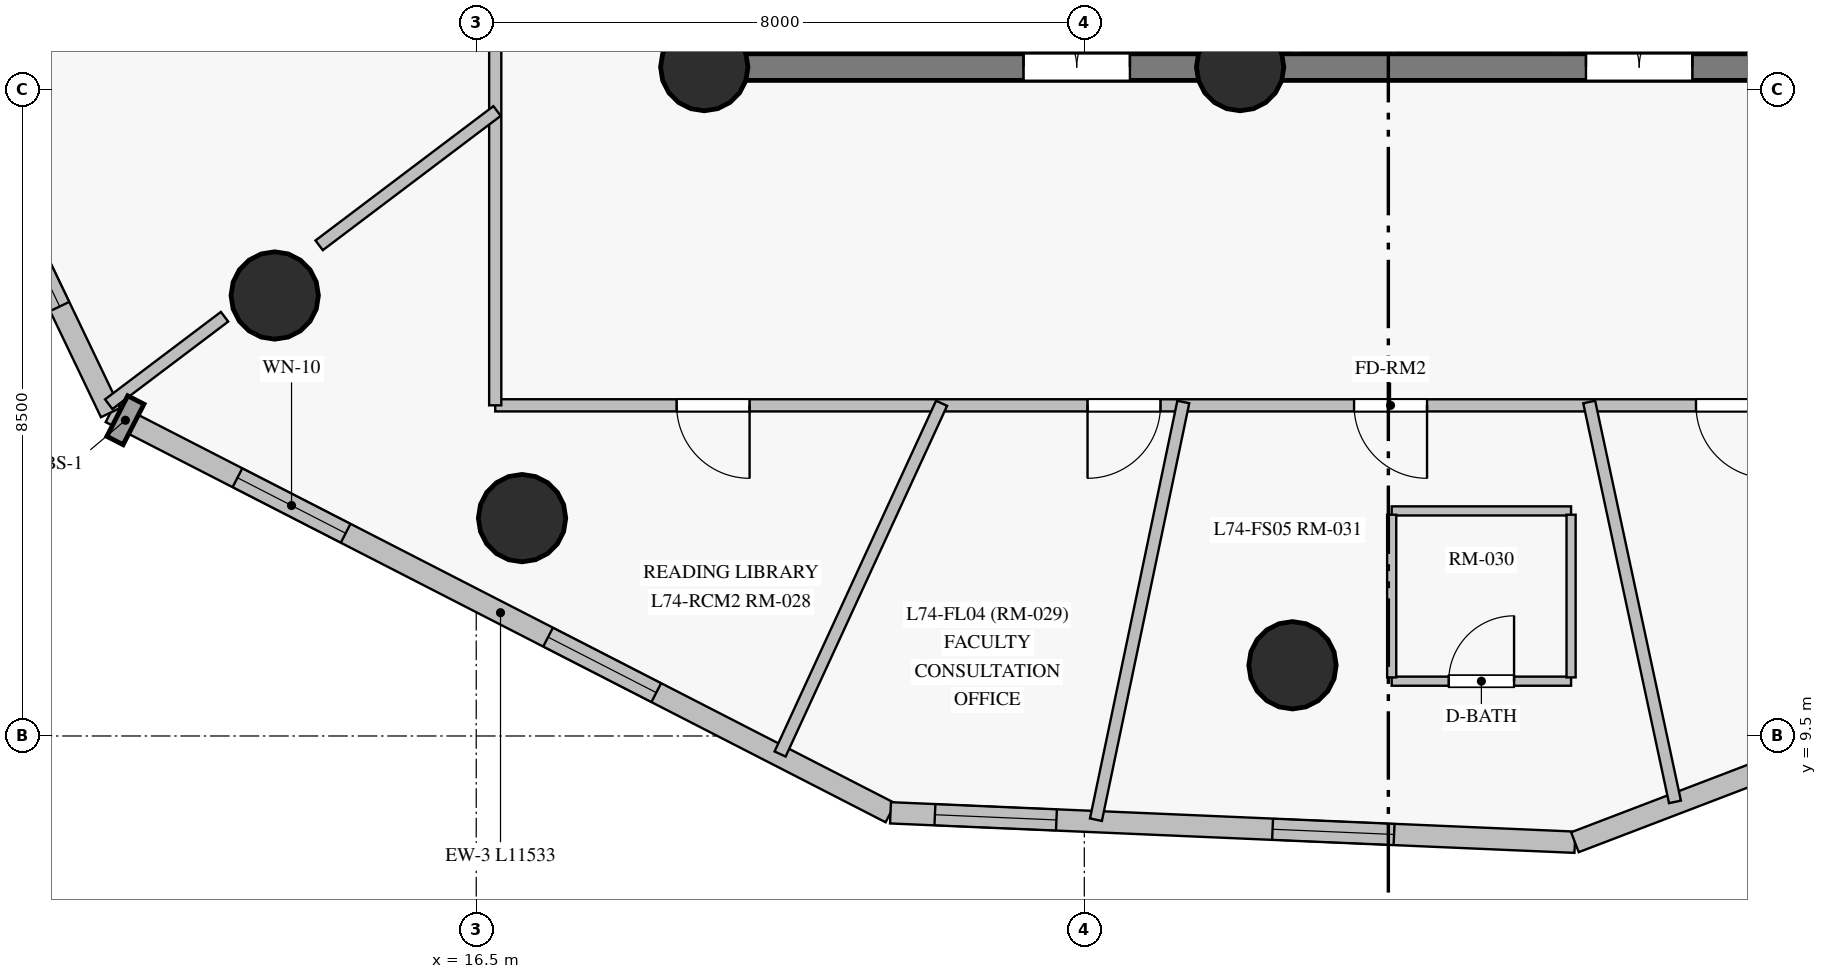
"""IFC4 building model, lengths in metres.
Left out: names, types, materials, properties, quantities, classifications, styles, units other than length and angle.
Written with IfcOpenShell. Run it as: python <this file> out.ifc"""

import sys

from ifc_helpers import new_model, si_unit, direction, frame, frame_2d, origin, origin_with_axes, origin_2d, place, context, subcontext, project, spatial, rectangle, circle, extrude, source, transform, mapped, element, fill, save


model = new_model("IFC4")
c1 = context("Model", 3, precision=1e-05, world=origin(), true_north=direction((0.0, 1.0)))
c2 = subcontext(c1, "Body", "Model", "MODEL_VIEW")
j1 = project(units=[si_unit("LENGTHUNIT", "METRE"), si_unit("PLANEANGLEUNIT", "RADIAN")], contexts=[c1])
p1 = place(None, origin())
s1 = spatial("IfcSite", under=j1, at=p1, CompositionType="ELEMENT")
p2 = place(p1, origin())
s2 = spatial("IfcBuilding", under=s1, at=p2, CompositionType="ELEMENT")
p3 = place(p2, frame((0.0, 0.0, 250.45)))
s3 = spatial("IfcBuildingStorey", under=s2, at=p3, CompositionType="ELEMENT", Elevation=250.45)
p4 = place(p3, frame((19.5, 18.3, 0.0), z_axis=(0.0, 0.0, 1.0), x_axis=(1.0, 0.0, 0.0)))
e1 = element("IfcWall", 1, at=p4, inside=s3, PredefinedType="SHEAR", context=c2, shape_type="SweptSolid", body=[
    extrude(rectangle(XDim=7.05, YDim=0.35, at=frame_2d((3.525, 0.0))), origin(), (0.0, 0.0, 1.0), 2.85),
])
p5 = place(p4, frame((4.2, 0.0, 0.0)))
e2 = element("IfcOpeningElement", 2, at=p5, cuts=e1, PredefinedType="OPENING", context=c2, shape_type="SweptSolid", body=[
    extrude(rectangle(XDim=1.4, YDim=2.2, at=frame_2d((0.7, 1.1))), frame((0.0, 0.185, 0.0), z_axis=(0.0, -1.0, 0.0), x_axis=(1.0, 0.0, 0.0)), (0.0, 0.0, 1.0), 0.37),
])
p6 = place(p3, frame((26.55, 18.3, 0.0), z_axis=(0.0, 0.0, 1.0), x_axis=(1.0, 0.0, 0.0)))
e3 = element("IfcWall", 3, at=p6, inside=s3, PredefinedType="SHEAR", context=c2, shape_type="SweptSolid", body=[
    extrude(rectangle(XDim=10.95, YDim=0.35, at=frame_2d((5.475, 0.0))), origin(), (0.0, 0.0, 1.0), 2.85),
])
p7 = place(p6, frame((4.55, 0.0, 0.0)))
e4 = element("IfcOpeningElement", 4, at=p7, cuts=e3, PredefinedType="OPENING", context=c2, shape_type="SweptSolid", body=[
    extrude(rectangle(XDim=1.4, YDim=2.2, at=frame_2d((0.7, 1.1))), frame((0.0, 0.185, 0.0), z_axis=(0.0, -1.0, 0.0), x_axis=(1.0, 0.0, 0.0)), (0.0, 0.0, 1.0), 0.37),
])
p8 = place(p3, frame((19.5, 34.7, 0.0), z_axis=(0.0, 0.0, 1.0), x_axis=(0.0, -1.0, 0.0)))
e5 = element("IfcWall", 5, at=p8, inside=s3, PredefinedType="SHEAR", context=c2, shape_type="SweptSolid", body=[
    extrude(rectangle(XDim=16.4, YDim=0.35, at=frame_2d((8.2, 0.0))), origin(), (0.0, 0.0, 1.0), 2.85),
])
p9 = place(p8, frame((3.24, 0.0, 0.0)))
e6 = element("IfcOpeningElement", 6, at=p9, cuts=e5, PredefinedType="OPENING", context=c2, shape_type="SweptSolid", body=[
    extrude(rectangle(XDim=1.1, YDim=2.15, at=frame_2d((0.55, 1.075))), frame((0.0, 0.185, 0.0), z_axis=(0.0, -1.0, 0.0), x_axis=(1.0, 0.0, 0.0)), (0.0, 0.0, 1.0), 0.37),
])
m1 = source(origin_with_axes(), c2, "Body", "SweptSolid", [
    extrude(circle(Radius=0.575, at=origin_2d()), origin(), (0.0, 0.0, 1.0), 3.05),
])
for number, where, z_axis, x_axis in (
    (7, (19.5, 18.3, 0.0), (0.0, 0.0, 1.0), (1.0, 0.0, 0.0)),
    (8, (26.55, 18.3, 0.0), (0.0, 0.0, 1.0), (1.0, 0.0, 0.0)),
    (9, (13.849, 15.295, 0.0), (0.0, 0.0, 1.0), (1.0, 0.0, 0.0)),
    (10, (17.103, 12.366, 0.0), (0.0, 0.0, 1.0), (1.0, 0.0, 0.0)),
    (11, (27.239, 10.43, 0.0), (0.0, 0.0, 1.0), (1.0, 0.0, 0.0)),
):
    element("IfcColumn", number, at=place(p3, frame(where, z_axis=z_axis, x_axis=x_axis)), inside=s3, PredefinedType="COLUMN", context=c2, shape_type="MappedRepresentation", body=[
        mapped(m1, transform((0.0, 0.0, 0.0), scale=1.0)),
    ])
p10 = place(p3, frame((11.689, 13.754, 0.0), z_axis=(0.0, 0.0, 1.0), x_axis=(0.889712974327, -0.456520342716, 0.0)))
e12 = element("IfcWall", 12, at=p10, inside=s3, PredefinedType="SOLIDWALL", context=c2, shape_type="SweptSolid", body=[
    extrude(rectangle(XDim=11.533, YDim=0.28, at=frame_2d((5.767, 0.0))), origin(), (0.0, 0.0, 1.0), 2.85),
])
p11 = place(p10, frame((1.877, 0.0, 0.85)))
e13 = element("IfcOpeningElement", 13, at=p11, cuts=e12, PredefinedType="OPENING", context=c2, shape_type="SweptSolid", body=[
    extrude(rectangle(XDim=1.6, YDim=1.6, at=frame_2d((0.8, 0.8))), frame((0.0, 0.15, 0.0), z_axis=(0.0, -1.0, 0.0), x_axis=(1.0, 0.0, 0.0)), (0.0, 0.0, 1.0), 0.3),
])
p12 = place(p10, frame((6.47, 0.0, 0.85)))
e14 = element("IfcOpeningElement", 14, at=p12, cuts=e12, PredefinedType="OPENING", context=c2, shape_type="SweptSolid", body=[
    extrude(rectangle(XDim=1.6, YDim=1.6, at=frame_2d((0.8, 0.8))), frame((0.0, 0.15, 0.0), z_axis=(0.0, -1.0, 0.0), x_axis=(1.0, 0.0, 0.0)), (0.0, 0.0, 1.0), 0.3),
])
p13 = place(p3, frame((21.95, 8.489, 0.0), z_axis=(0.0, 0.0, 1.0), x_axis=(0.999077856383, -0.042935263879, 0.0)))
e15 = element("IfcWall", 15, at=p13, inside=s3, PredefinedType="SOLIDWALL", context=c2, shape_type="SweptSolid", body=[
    extrude(rectangle(XDim=9.013, YDim=0.28, at=frame_2d((4.506, 0.0))), origin(), (0.0, 0.0, 1.0), 2.85),
])
p14 = place(p13, frame((0.585, 0.0, 0.85)))
e16 = element("IfcOpeningElement", 16, at=p14, cuts=e15, PredefinedType="OPENING", context=c2, shape_type="SweptSolid", body=[
    extrude(rectangle(XDim=1.6, YDim=1.6, at=frame_2d((0.8, 0.8))), frame((0.0, 0.15, 0.0), z_axis=(0.0, -1.0, 0.0), x_axis=(1.0, 0.0, 0.0)), (0.0, 0.0, 1.0), 0.3),
])
p15 = place(p13, frame((5.031, 0.0, 0.85)))
e17 = element("IfcOpeningElement", 17, at=p15, cuts=e15, PredefinedType="OPENING", context=c2, shape_type="SweptSolid", body=[
    extrude(rectangle(XDim=1.6, YDim=1.6, at=frame_2d((0.8, 0.8))), frame((0.0, 0.15, 0.0), z_axis=(0.0, -1.0, 0.0), x_axis=(1.0, 0.0, 0.0)), (0.0, 0.0, 1.0), 0.3),
])
p16 = place(p3, frame((30.955, 8.102, 0.0), z_axis=(0.0, 0.0, 1.0), x_axis=(0.934050651189, 0.357140561984, 0.0)))
e18 = element("IfcWall", 18, at=p16, inside=s3, PredefinedType="SOLIDWALL", context=c2, shape_type="SweptSolid", body=[
    extrude(rectangle(XDim=12.142, YDim=0.28, at=frame_2d((6.071, 0.0))), origin(), (0.0, 0.0, 1.0), 2.85),
])
p17 = place(p16, frame((3.449, 0.0, 0.85)))
e19 = element("IfcOpeningElement", 19, at=p17, cuts=e18, PredefinedType="OPENING", context=c2, shape_type="SweptSolid", body=[
    extrude(rectangle(XDim=1.6, YDim=1.6, at=frame_2d((0.8, 0.8))), frame((0.0, 0.15, 0.0), z_axis=(0.0, -1.0, 0.0), x_axis=(1.0, 0.0, 0.0)), (0.0, 0.0, 1.0), 0.3),
])
p18 = place(p16, frame((8.458, 0.0, 0.85)))
e20 = element("IfcOpeningElement", 20, at=p18, cuts=e18, PredefinedType="OPENING", context=c2, shape_type="SweptSolid", body=[
    extrude(rectangle(XDim=1.6, YDim=1.6, at=frame_2d((0.8, 0.8))), frame((0.0, 0.15, 0.0), z_axis=(0.0, -1.0, 0.0), x_axis=(1.0, 0.0, 0.0)), (0.0, 0.0, 1.0), 0.3),
])
p19 = place(p3, frame((8.033, 21.385, 0.0), z_axis=(0.0, 0.0, 1.0), x_axis=(0.432111869591, -0.901820010955, 0.0)))
e21 = element("IfcWall", 21, at=p19, inside=s3, PredefinedType="SOLIDWALL", context=c2, shape_type="SweptSolid", body=[
    extrude(rectangle(XDim=8.461, YDim=0.28, at=frame_2d((4.231, 0.0))), origin(), (0.0, 0.0, 1.0), 2.85),
])
p20 = place(p19, frame((1.491, 0.0, 0.85)))
e22 = element("IfcOpeningElement", 22, at=p20, cuts=e21, PredefinedType="OPENING", context=c2, shape_type="SweptSolid", body=[
    extrude(rectangle(XDim=1.6, YDim=1.6, at=frame_2d((0.8, 0.8))), frame((0.0, 0.15, 0.0), z_axis=(0.0, -1.0, 0.0), x_axis=(1.0, 0.0, 0.0)), (0.0, 0.0, 1.0), 0.3),
])
p21 = place(p19, frame((5.313, 0.0, 0.85)))
e23 = element("IfcOpeningElement", 23, at=p21, cuts=e21, PredefinedType="OPENING", context=c2, shape_type="SweptSolid", body=[
    extrude(rectangle(XDim=1.6, YDim=1.6, at=frame_2d((0.8, 0.8))), frame((0.0, 0.15, 0.0), z_axis=(0.0, -1.0, 0.0), x_axis=(1.0, 0.0, 0.0)), (0.0, 0.0, 1.0), 0.3),
])
p22 = place(p3, frame((41.8, 13.85, 0.0), z_axis=(0.0, 0.0, 1.0), x_axis=(-1.0, 0.0, 0.0)))
e24 = element("IfcWall", 24, at=p22, inside=s3, PredefinedType="PARTITIONING", context=c2, shape_type="SweptSolid", body=[
    extrude(rectangle(XDim=25.05, YDim=0.16, at=frame_2d((12.525, 0.0))), origin(), (0.0, 0.0, 1.0), 2.3),
])
p23 = place(p22, frame((12.791, 0.0, 0.0)))
e25 = element("IfcOpeningElement", 25, at=p23, cuts=e24, PredefinedType="OPENING", context=c2, shape_type="SweptSolid", body=[
    extrude(rectangle(XDim=0.96, YDim=2.15, at=frame_2d((0.48, 1.075))), frame((0.0, 0.09, 0.0), z_axis=(0.0, -1.0, 0.0), x_axis=(1.0, 0.0, 0.0)), (0.0, 0.0, 1.0), 0.18),
])
p24 = place(p22, frame((21.704, 0.0, 0.0)))
e26 = element("IfcOpeningElement", 26, at=p24, cuts=e24, PredefinedType="OPENING", context=c2, shape_type="SweptSolid", body=[
    extrude(rectangle(XDim=0.96, YDim=2.15, at=frame_2d((0.48, 1.075))), frame((0.0, 0.09, 0.0), z_axis=(0.0, -1.0, 0.0), x_axis=(1.0, 0.0, 0.0)), (0.0, 0.0, 1.0), 0.18),
])
p25 = place(p22, frame((16.298, 0.0, 0.0)))
e27 = element("IfcOpeningElement", 27, at=p25, cuts=e24, PredefinedType="OPENING", context=c2, shape_type="SweptSolid", body=[
    extrude(rectangle(XDim=0.96, YDim=2.15, at=frame_2d((0.48, 1.075))), frame((0.0, 0.09, 0.0), z_axis=(0.0, -1.0, 0.0), x_axis=(1.0, 0.0, 0.0)), (0.0, 0.0, 1.0), 0.18),
])
p26 = place(p22, frame((8.292, 0.0, 0.0)))
e28 = element("IfcOpeningElement", 28, at=p26, cuts=e24, PredefinedType="OPENING", context=c2, shape_type="SweptSolid", body=[
    extrude(rectangle(XDim=0.96, YDim=2.15, at=frame_2d((0.48, 1.075))), frame((0.0, 0.09, 0.0), z_axis=(0.0, -1.0, 0.0), x_axis=(1.0, 0.0, 0.0)), (0.0, 0.0, 1.0), 0.18),
])
p27 = place(p3, frame((16.75, 13.85, 0.0), z_axis=(0.0, 0.0, 1.0), x_axis=(0.0, 1.0, 0.0)))
e29 = element("IfcWall", 29, at=p27, inside=s3, PredefinedType="PARTITIONING", context=c2, shape_type="SweptSolid", body=[
    extrude(rectangle(XDim=17.8, YDim=0.16, at=frame_2d((8.9, 0.0))), origin(), (0.0, 0.0, 1.0), 2.45),
])
p28 = place(p27, frame((16.226, 0.0, 0.0)))
e30 = element("IfcOpeningElement", 30, at=p28, cuts=e29, PredefinedType="OPENING", context=c2, shape_type="SweptSolid", body=[
    extrude(rectangle(XDim=0.96, YDim=2.15, at=frame_2d((0.48, 1.075))), frame((0.0, 0.09, 0.0), z_axis=(0.0, -1.0, 0.0), x_axis=(1.0, 0.0, 0.0)), (0.0, 0.0, 1.0), 0.18),
])
p29 = place(p27, frame((11.095, 0.0, 0.0)))
e31 = element("IfcOpeningElement", 31, at=p29, cuts=e29, PredefinedType="OPENING", context=c2, shape_type="SweptSolid", body=[
    extrude(rectangle(XDim=0.96, YDim=2.15, at=frame_2d((0.48, 1.075))), frame((0.0, 0.09, 0.0), z_axis=(0.0, -1.0, 0.0), x_axis=(1.0, 0.0, 0.0)), (0.0, 0.0, 1.0), 0.18),
])
p30 = place(p27, frame((8.425, 0.0, 0.0)))
e32 = element("IfcOpeningElement", 32, at=p30, cuts=e29, PredefinedType="OPENING", context=c2, shape_type="SweptSolid", body=[
    extrude(rectangle(XDim=0.96, YDim=2.15, at=frame_2d((0.48, 1.075))), frame((0.0, 0.09, 0.0), z_axis=(0.0, -1.0, 0.0), x_axis=(1.0, 0.0, 0.0)), (0.0, 0.0, 1.0), 0.18),
])
p31 = place(p3, frame((25.802, 13.894, 0.0), z_axis=(0.0, 0.0, 1.0), x_axis=(-0.204730419628, -0.978818397497, 0.0)))
e33 = element("IfcWall", 33, at=p31, inside=s3, PredefinedType="PARTITIONING", context=c2, shape_type="SweptSolid", body=[
    extrude(rectangle(XDim=5.614, YDim=0.16, at=frame_2d((2.807, 0.0))), origin(), (0.0, 0.0, 1.0), 2.85),
])
p32 = place(p3, frame((31.143, 13.894, 0.0), z_axis=(0.0, 0.0, 1.0), x_axis=(0.209708802078, -0.9777638868, 0.0)))
e34 = element("IfcWall", 34, at=p32, inside=s3, PredefinedType="PARTITIONING", context=c2, shape_type="SweptSolid", body=[
    extrude(rectangle(XDim=5.381, YDim=0.16, at=frame_2d((2.69, 0.0))), origin(), (0.0, 0.0, 1.0), 2.85),
])
p33 = place(p3, frame((22.622, 13.877, 0.0), z_axis=(0.0, 0.0, 1.0), x_axis=(-0.4182046618, -0.908352828393, 0.0)))
e35 = element("IfcWall", 35, at=p33, inside=s3, PredefinedType="PARTITIONING", context=c2, shape_type="SweptSolid", body=[
    extrude(rectangle(XDim=5.08, YDim=0.16, at=frame_2d((2.54, 0.0))), origin(), (0.0, 0.0, 1.0), 2.85),
])
p34 = place(p3, frame((16.774, 17.722, 0.0), z_axis=(0.0, 0.0, 1.0), x_axis=(-0.798087936227, -0.602540991177, 0.0)))
e36 = element("IfcWall", 36, at=p34, inside=s3, PredefinedType="PARTITIONING", context=c2, shape_type="SweptSolid", body=[
    extrude(rectangle(XDim=2.933, YDim=0.16, at=frame_2d((1.466, 0.0))), origin(), (0.0, 0.0, 1.0), 2.35),
])
p35 = place(p3, frame((27.28, 18.482, 0.0), z_axis=(0.0, 0.0, 1.0), x_axis=(0.0, 1.0, 0.0)))
e37 = element("IfcWall", 37, at=p35, inside=s3, PredefinedType="PARTITIONING", context=c2, shape_type="SweptSolid", body=[
    extrude(rectangle(XDim=2.758, YDim=0.14, at=frame_2d((1.379, 0.0))), origin(), (0.0, 0.0, 1.0), 2.85),
])
p36 = place(p35, frame((0.74, 0.0, 0.0)))
e38 = element("IfcOpeningElement", 38, at=p36, cuts=e37, PredefinedType="OPENING", context=c2, shape_type="SweptSolid", body=[
    extrude(rectangle(XDim=0.86, YDim=2.1, at=frame_2d((0.43, 1.05))), frame((0.0, 0.08, 0.0), z_axis=(0.0, -1.0, 0.0), x_axis=(1.0, 0.0, 0.0)), (0.0, 0.0, 1.0), 0.16),
])
p37 = place(p3, frame((30.72, 18.482, 0.0), z_axis=(0.0, 0.0, 1.0), x_axis=(0.0, 1.0, 0.0)))
e39 = element("IfcWall", 39, at=p37, inside=s3, PredefinedType="PARTITIONING", context=c2, shape_type="SweptSolid", body=[
    extrude(rectangle(XDim=2.758, YDim=0.14, at=frame_2d((1.379, 0.0))), origin(), (0.0, 0.0, 1.0), 2.85),
])
p38 = place(p3, frame((28.58, 18.482, 0.0), z_axis=(0.0, 0.0, 1.0), x_axis=(0.0, 1.0, 0.0)))
e40 = element("IfcWall", 40, at=p38, inside=s3, PredefinedType="PARTITIONING", context=c2, shape_type="SweptSolid", body=[
    extrude(rectangle(XDim=2.687, YDim=0.12, at=frame_2d((1.344, 0.0))), origin(), (0.0, 0.0, 1.0), 2.85),
])
p39 = place(p3, frame((28.544, 10.221, 0.0), z_axis=(0.0, 0.0, 1.0), x_axis=(1.0, 0.0, 0.0)))
e41 = element("IfcWall", 41, at=p39, inside=s3, PredefinedType="PARTITIONING", context=c2, shape_type="SweptSolid", body=[
    extrude(rectangle(XDim=2.36, YDim=0.12, at=frame_2d((1.18, 0.0))), origin(), (0.0, 0.0, 1.0), 2.85),
])
p40 = place(p39, frame((0.75, 0.0, 0.0)))
e42 = element("IfcOpeningElement", 42, at=p40, cuts=e41, PredefinedType="OPENING", context=c2, shape_type="SweptSolid", body=[
    extrude(rectangle(XDim=0.86, YDim=2.1, at=frame_2d((0.43, 1.05))), frame((0.0, 0.07, 0.0), z_axis=(0.0, -1.0, 0.0), x_axis=(1.0, 0.0, 0.0)), (0.0, 0.0, 1.0), 0.14),
])
p41 = place(p3, frame((30.904, 12.461, 0.0), z_axis=(0.0, 0.0, 1.0), x_axis=(-1.0, 0.0, 0.0)))
e43 = element("IfcWall", 43, at=p41, inside=s3, PredefinedType="PARTITIONING", context=c2, shape_type="SweptSolid", body=[
    extrude(rectangle(XDim=2.36, YDim=0.12, at=frame_2d((1.18, 0.0))), origin(), (0.0, 0.0, 1.0), 2.3),
])
for number, where, z_axis, x_axis in (
    (44, (30.904, 10.271, 0.0), (0.0, 0.0, 1.0), (0.0, 1.0, 0.0)),
    (45, (28.544, 12.411, 0.0), (0.0, 0.0, 1.0), (0.0, -1.0, 0.0)),
):
    element("IfcWall", number, at=place(p3, frame(where, z_axis=z_axis, x_axis=x_axis)), inside=s3, PredefinedType="PARTITIONING", context=c2, shape_type="SweptSolid", body=[
        extrude(rectangle(XDim=2.14, YDim=0.12, at=frame_2d((1.07, 0.0))), origin(), (0.0, 0.0, 1.0), 2.85),
    ])
p42 = place(p3, frame((13.189, 15.015, 0.0), z_axis=(0.0, 0.0, 1.0), x_axis=(-0.798124184404, -0.602492976116, 0.0)))
e46 = element("IfcWall", 46, at=p42, inside=s3, PredefinedType="PARTITIONING", context=c2, shape_type="SweptSolid", body=[
    extrude(rectangle(XDim=1.909, YDim=0.16, at=frame_2d((0.955, 0.0))), origin(), (0.0, 0.0, 1.0), 2.85),
])
m2 = source(origin_with_axes(), c2, "Body", "SweptSolid", [
    extrude(rectangle(XDim=1.6, YDim=1.6, at=frame_2d((0.8, 0.8))), frame((0.0, 0.03, 0.0), z_axis=(0.0, -1.0, 0.0), x_axis=(1.0, 0.0, 0.0)), (0.0, 0.0, 1.0), 0.06),
])
p43 = place(p11, origin())
e47 = element("IfcWindow", 47, at=p43, inside=s3, PartitioningType="SINGLE_PANEL", PredefinedType="WINDOW", context=c2, shape_type="MappedRepresentation", body=[
    mapped(m2, transform((0.0, 0.0, 0.0), scale=1.0)),
])
fill(e13, e47)
p44 = place(p12, origin())
e48 = element("IfcWindow", 48, at=p44, inside=s3, PartitioningType="SINGLE_PANEL", PredefinedType="WINDOW", context=c2, shape_type="MappedRepresentation", body=[
    mapped(m2, transform((0.0, 0.0, 0.0), scale=1.0)),
])
fill(e14, e48)
p45 = place(p14, origin())
e49 = element("IfcWindow", 49, at=p45, inside=s3, PartitioningType="SINGLE_PANEL", PredefinedType="WINDOW", context=c2, shape_type="MappedRepresentation", body=[
    mapped(m2, transform((0.0, 0.0, 0.0), scale=1.0)),
])
fill(e16, e49)
p46 = place(p15, origin())
e50 = element("IfcWindow", 50, at=p46, inside=s3, PartitioningType="SINGLE_PANEL", PredefinedType="WINDOW", context=c2, shape_type="MappedRepresentation", body=[
    mapped(m2, transform((0.0, 0.0, 0.0), scale=1.0)),
])
fill(e17, e50)
p47 = place(p21, origin())
e51 = element("IfcWindow", 51, at=p47, inside=s3, PartitioningType="SINGLE_PANEL", PredefinedType="WINDOW", context=c2, shape_type="MappedRepresentation", body=[
    mapped(m2, transform((0.0, 0.0, 0.0), scale=1.0)),
])
fill(e23, e51)
m3 = source(origin_with_axes(), c2, "Body", "SweptSolid", [
    extrude(rectangle(XDim=1.4, YDim=2.2, at=frame_2d((0.7, 1.1))), frame((0.0, 0.025, 0.0), z_axis=(0.0, -1.0, 0.0), x_axis=(1.0, 0.0, 0.0)), (0.0, 0.0, 1.0), 0.05),
])
p48 = place(p5, origin())
e52 = element("IfcDoor", 52, at=p48, inside=s3, OperationType="DOUBLE_DOOR_SINGLE_SWING", PredefinedType="DOOR", context=c2, shape_type="MappedRepresentation", body=[
    mapped(m3, transform((0.0, 0.0, 0.0), scale=1.0)),
])
fill(e2, e52)
p49 = place(p7, origin())
e53 = element("IfcDoor", 53, at=p49, inside=s3, OperationType="DOUBLE_DOOR_SINGLE_SWING", PredefinedType="DOOR", context=c2, shape_type="MappedRepresentation", body=[
    mapped(m3, transform((0.0, 0.0, 0.0), scale=1.0)),
])
fill(e4, e53)
m4 = source(origin_with_axes(), c2, "Body", "SweptSolid", [
    extrude(rectangle(XDim=0.86, YDim=2.1, at=frame_2d((0.43, 1.05))), frame((0.0, 0.025, 0.0), z_axis=(0.0, -1.0, 0.0), x_axis=(1.0, 0.0, 0.0)), (0.0, 0.0, 1.0), 0.05),
])
p50 = place(p40, origin())
e54 = element("IfcDoor", 54, at=p50, inside=s3, OperationType="SINGLE_SWING_RIGHT", PredefinedType="DOOR", context=c2, shape_type="MappedRepresentation", body=[
    mapped(m4, transform((0.0, 0.0, 0.0), scale=1.0)),
])
fill(e42, e54)
m5 = source(origin_with_axes(), c2, "Body", "SweptSolid", [
    extrude(rectangle(XDim=0.96, YDim=2.15, at=frame_2d((0.48, 1.075))), frame((0.0, 0.025, 0.0), z_axis=(0.0, -1.0, 0.0), x_axis=(1.0, 0.0, 0.0)), (0.0, 0.0, 1.0), 0.05),
])
p51 = place(p23, origin())
e55 = element("IfcDoor", 55, at=p51, inside=s3, OperationType="SINGLE_SWING_LEFT", PredefinedType="DOOR", context=c2, shape_type="MappedRepresentation", body=[
    mapped(m5, transform((0.0, 0.0, 0.0), scale=1.0)),
])
fill(e25, e55)
p52 = place(p24, origin())
e56 = element("IfcDoor", 56, at=p52, inside=s3, OperationType="SINGLE_SWING_LEFT", PredefinedType="DOOR", context=c2, shape_type="MappedRepresentation", body=[
    mapped(m5, transform((0.0, 0.0, 0.0), scale=1.0)),
])
fill(e26, e56)
p53 = place(p25, origin())
e57 = element("IfcDoor", 57, at=p53, inside=s3, OperationType="SINGLE_SWING_RIGHT", PredefinedType="DOOR", context=c2, shape_type="MappedRepresentation", body=[
    mapped(m5, transform((0.0, 0.0, 0.0), scale=1.0)),
])
fill(e27, e57)
p54 = place(p26, origin())
e58 = element("IfcDoor", 58, at=p54, inside=s3, OperationType="SINGLE_SWING_LEFT", PredefinedType="DOOR", context=c2, shape_type="MappedRepresentation", body=[
    mapped(m5, transform((0.0, 0.0, 0.0), scale=1.0)),
])
fill(e28, e58)
save(model, sys.argv[1])
